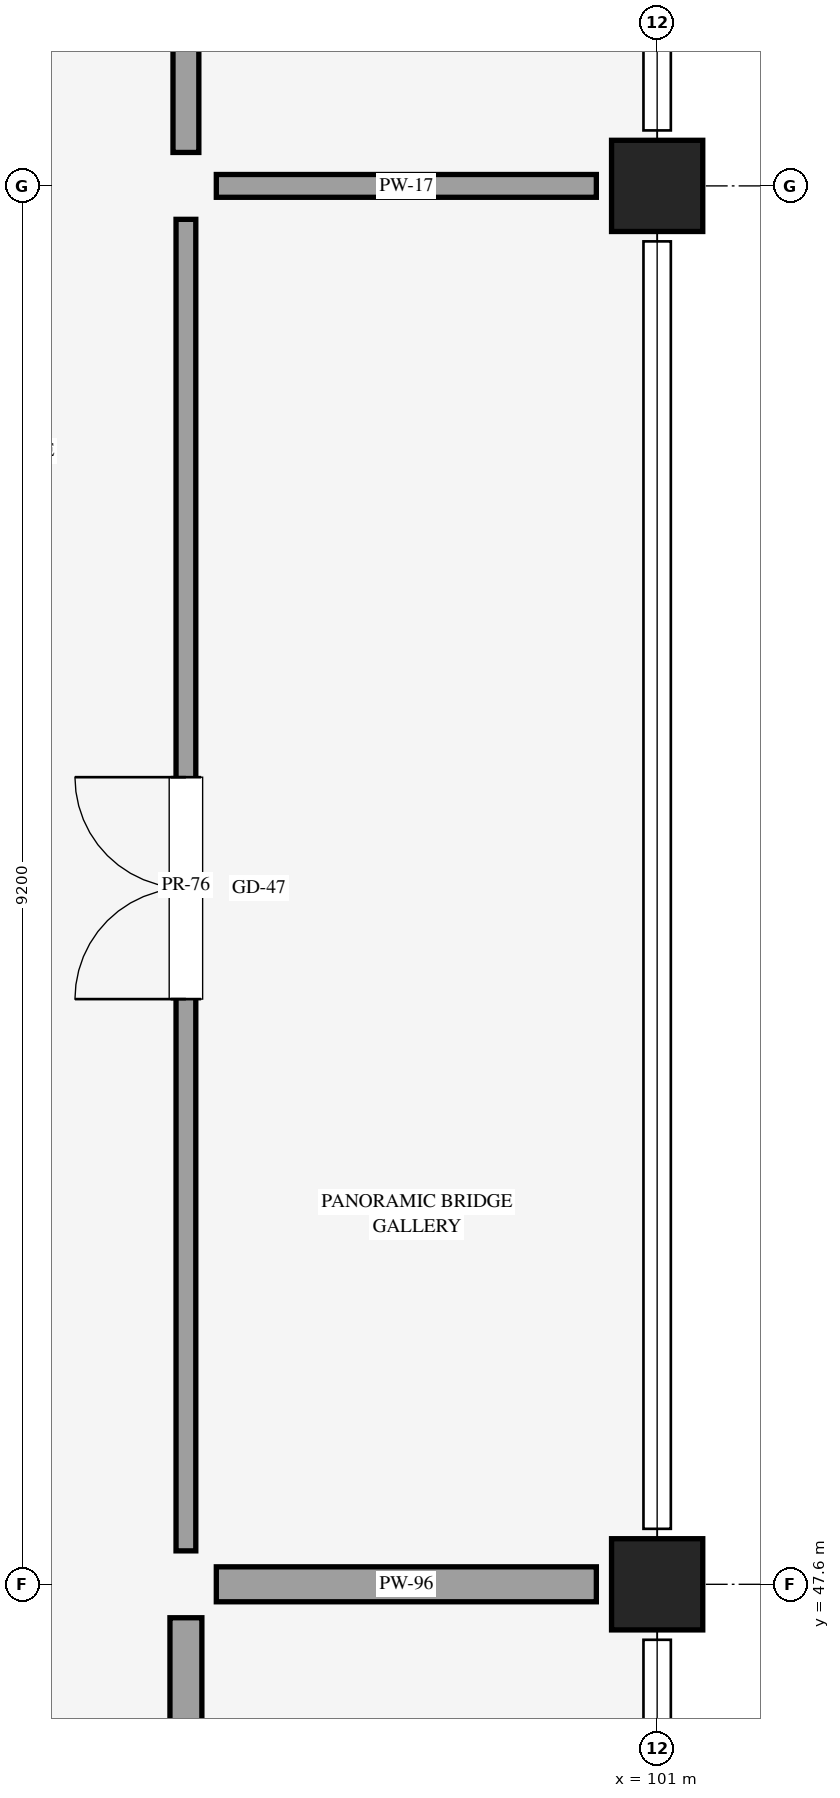
"""IFC4 building model, lengths in metres.
Left out: names, types, materials, properties, quantities, classifications, styles, units other than length and angle.
Written with IfcOpenShell. Run it as: python <this file> out.ifc"""

import sys

from ifc_helpers import new_model, si_unit, direction, frame, frame_2d, origin, origin_2d, place, context, subcontext, project, spatial, rectangle, extrude, element, fill, save


model = new_model("IFC4")
c1 = context("Model", 3, precision=1e-05, world=origin(), true_north=direction((0.0, 1.0)))
c2 = subcontext(c1, "Body", "Model", "MODEL_VIEW")
j1 = project(units=[si_unit("LENGTHUNIT", "METRE"), si_unit("PLANEANGLEUNIT", "RADIAN")], contexts=[c1])
p1 = place(None, origin())
s1 = spatial("IfcSite", under=j1, at=p1, CompositionType="ELEMENT")
p2 = place(p1, origin())
s2 = spatial("IfcBuilding", under=s1, at=p2, CompositionType="ELEMENT")
p3 = place(p2, frame((0.0, 0.0, 10.2)))
s3 = spatial("IfcBuildingStorey", under=s2, at=p3, CompositionType="ELEMENT", Elevation=10.2)
for number, where, z_axis, x_axis in (
    (1, (101.0, 47.6, 0.0), (0.0, 0.0, 1.0), (1.0, 0.0, 0.0)),
    (2, (101.0, 56.8, 0.0), (0.0, 0.0, 1.0), (1.0, 0.0, 0.0)),
):
    element("IfcColumn", number, at=place(p3, frame(where, z_axis=z_axis, x_axis=x_axis)), inside=s3, PredefinedType="COLUMN", context=c2, shape_type="SweptSolid", body=[
        extrude(rectangle(XDim=0.6, YDim=0.6, at=origin_2d()), origin(), (0.0, 0.0, 1.0), 4.8),
    ])
p4 = place(p3, frame((97.9, 38.94, 0.0), z_axis=(0.0, 0.0, 1.0), x_axis=(0.0, 1.0, 0.0)))
e3 = element("IfcWall", 3, at=p4, inside=s3, PredefinedType="PARTITIONING", context=c2, shape_type="SweptSolid", body=[
    extrude(rectangle(XDim=8.44, YDim=0.21, at=frame_2d((4.22, 0.0))), origin(), (0.0, 0.0, 1.0), 3.925),
])
p5 = place(p4, frame((3.519, 0.0, 0.0)))
e4 = element("IfcOpeningElement", 4, at=p5, cuts=e3, PredefinedType="OPENING", context=c2, shape_type="SweptSolid", body=[
    extrude(rectangle(XDim=1.24, YDim=2.32, at=frame_2d((0.62, 1.16))), frame((0.0, 0.115, 0.0), z_axis=(0.0, -1.0, 0.0), x_axis=(1.0, 0.0, 0.0)), (0.0, 0.0, 1.0), 0.23),
])
p6 = place(p3, frame((98.1, 47.6, 0.0), z_axis=(0.0, 0.0, 1.0), x_axis=(1.0, 0.0, 0.0)))
e5 = element("IfcWall", 5, at=p6, inside=s3, PredefinedType="PARTITIONING", context=c2, shape_type="SweptSolid", body=[
    extrude(rectangle(XDim=2.5, YDim=0.23, at=frame_2d((1.25, 0.0))), origin(), (0.0, 0.0, 1.0), 3.925),
])
p7 = place(p3, frame((97.9, 47.82, 0.0), z_axis=(0.0, 0.0, 1.0), x_axis=(0.0, 1.0, 0.0)))
e6 = element("IfcWall", 6, at=p7, inside=s3, PredefinedType="PARTITIONING", context=c2, shape_type="SweptSolid", body=[
    extrude(rectangle(XDim=8.76, YDim=0.13, at=frame_2d((4.38, 0.0))), origin(), (0.0, 0.0, 1.0), 3.925),
])
p8 = place(p7, frame((3.63, 0.0, 0.0)))
e7 = element("IfcOpeningElement", 7, at=p8, cuts=e6, PredefinedType="OPENING", context=c2, shape_type="SweptSolid", body=[
    extrude(rectangle(XDim=1.46, YDim=2.32, at=frame_2d((0.73, 1.16))), frame((0.0, 0.075, 0.0), z_axis=(0.0, -1.0, 0.0), x_axis=(1.0, 0.0, 0.0)), (0.0, 0.0, 1.0), 0.15),
])
p9 = place(p3, frame((98.1, 56.8, 0.0), z_axis=(0.0, 0.0, 1.0), x_axis=(1.0, 0.0, 0.0)))
e8 = element("IfcWall", 8, at=p9, inside=s3, PredefinedType="PARTITIONING", context=c2, shape_type="SweptSolid", body=[
    extrude(rectangle(XDim=2.5, YDim=0.15, at=frame_2d((1.25, 0.0))), origin(), (0.0, 0.0, 1.0), 3.925),
])
p10 = place(p3, frame((97.9, 57.02, 0.0), z_axis=(0.0, 0.0, 1.0), x_axis=(0.0, 1.0, 0.0)))
e9 = element("IfcWall", 9, at=p10, inside=s3, PredefinedType="PARTITIONING", context=c2, shape_type="SweptSolid", body=[
    extrude(rectangle(XDim=8.76, YDim=0.17, at=frame_2d((4.38, 0.0))), origin(), (0.0, 0.0, 1.0), 3.925),
])
p11 = place(p10, frame((3.88, 0.0, 0.0)))
e10 = element("IfcOpeningElement", 10, at=p11, cuts=e9, PredefinedType="OPENING", context=c2, shape_type="SweptSolid", body=[
    extrude(rectangle(XDim=1.0, YDim=2.2, at=frame_2d((0.5, 1.1))), frame((0.0, 0.095, 0.0), z_axis=(0.0, -1.0, 0.0), x_axis=(1.0, 0.0, 0.0)), (0.0, 0.0, 1.0), 0.19),
])
p12 = place(p8, origin())
e11 = element("IfcDoor", 11, at=p12, inside=s3, OperationType="DOUBLE_DOOR_SINGLE_SWING", PredefinedType="DOOR", context=c2, shape_type="SweptSolid", body=[
    extrude(rectangle(XDim=1.46, YDim=2.32, at=frame_2d((0.73, 1.16))), frame((0.0, 0.025, 0.0), z_axis=(0.0, -1.0, 0.0), x_axis=(1.0, 0.0, 0.0)), (0.0, 0.0, 1.0), 0.05),
])
fill(e7, e11)
save(model, sys.argv[1])
